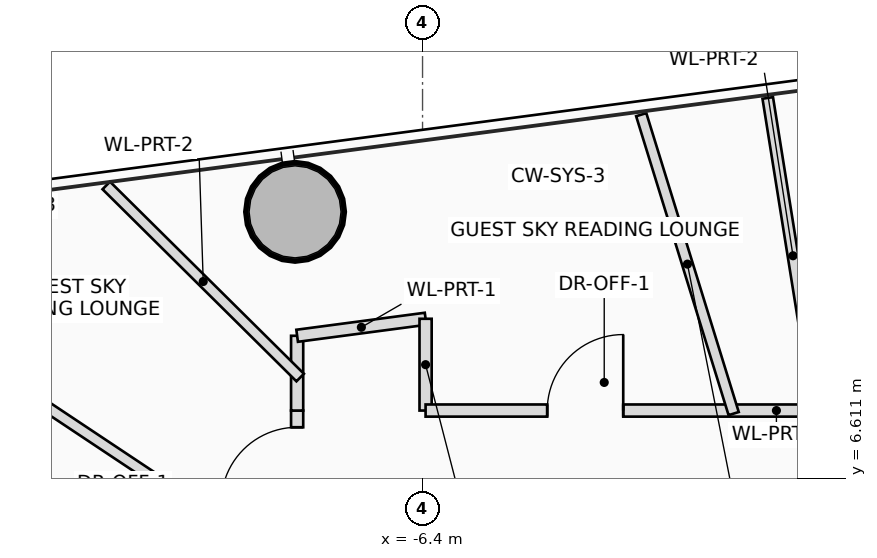
"""IFC4 building model, lengths in metres.
Left out: names, types, materials, properties, quantities, classifications, styles, units other than length and angle.
Written with IfcOpenShell. Run it as: python <this file> out.ifc"""

import sys

from ifc_helpers import new_model, si_unit, direction, frame, frame_2d, origin, origin_2d, place, context, subcontext, project, spatial, rectangle, hollow_circle, extrude, source, transform, mapped, element, fill, save


model = new_model("IFC4")
c1 = context("Model", 3, precision=1e-05, world=origin(), true_north=direction((0.0, 1.0)))
c2 = subcontext(c1, "Body", "Model", "MODEL_VIEW")
j1 = project(units=[si_unit("LENGTHUNIT", "METRE"), si_unit("PLANEANGLEUNIT", "RADIAN")], contexts=[c1])
p1 = place(None, origin())
s1 = spatial("IfcSite", under=j1, at=p1, CompositionType="ELEMENT")
p2 = place(p1, origin())
s2 = spatial("IfcBuilding", under=s1, at=p2, CompositionType="ELEMENT")
p3 = place(p2, frame((0.0, 0.0, 158.75)))
s3 = spatial("IfcBuildingStorey", under=s2, at=p3, CompositionType="ELEMENT", Elevation=158.75)
m1 = source(origin(), c2, "Body", "SweptSolid", [
    extrude(hollow_circle(Radius=0.65, WallThickness=0.045, at=origin_2d()), origin(), (0.0, 0.0, 1.0), 3.45),
])
p4 = place(p3, frame((-8.077, 10.114, 0.0), z_axis=(0.0, 0.0, 1.0), x_axis=(1.0, 0.0, 0.0)))
e1 = element("IfcColumn", 1, at=p4, inside=s3, PredefinedType="COLUMN", context=c2, shape_type="MappedRepresentation", body=[
    mapped(m1, transform((0.0, 0.0, 0.0), scale=1.0)),
])
p5 = place(p3, frame((-8.05, -7.5, 0.0), z_axis=(0.0, 0.0, 1.0), x_axis=(0.0, 1.0, 0.0)))
e2 = element("IfcWall", 2, at=p5, inside=s3, PredefinedType="PARTITIONING", context=c2, shape_type="SweptSolid", body=[
    extrude(rectangle(XDim=15.0, YDim=0.16, at=frame_2d((7.5, 0.0))), origin(), (0.0, 0.0, 1.0), 2.605),
])
p6 = place(p5, frame((6.753, 0.0, 0.0)))
e3 = element("IfcOpeningElement", 3, at=p6, cuts=e2, PredefinedType="OPENING", context=c2, shape_type="SweptSolid", body=[
    extrude(rectangle(XDim=1.05, YDim=2.2, at=frame_2d((0.525, 1.1))), frame((0.0, 0.09, 0.0), z_axis=(0.0, -1.0, 0.0), x_axis=(1.0, 0.0, 0.0)), (0.0, 0.0, 1.0), 0.18),
])
p7 = place(p5, frame((10.436, 0.0, 0.0)))
e4 = element("IfcOpeningElement", 4, at=p7, cuts=e2, PredefinedType="OPENING", context=c2, shape_type="SweptSolid", body=[
    extrude(rectangle(XDim=1.05, YDim=2.2, at=frame_2d((0.525, 1.1))), frame((0.0, 0.09, 0.0), z_axis=(0.0, -1.0, 0.0), x_axis=(1.0, 0.0, 0.0)), (0.0, 0.0, 1.0), 0.18),
])
p8 = place(p5, frame((13.78, 0.0, 0.0)))
e5 = element("IfcOpeningElement", 5, at=p8, cuts=e2, PredefinedType="OPENING", context=c2, shape_type="SweptSolid", body=[
    extrude(rectangle(XDim=1.0, YDim=2.25, at=frame_2d((0.5, 1.125))), frame((0.0, 0.09, 0.0), z_axis=(0.0, -1.0, 0.0), x_axis=(1.0, 0.0, 0.0)), (0.0, 0.0, 1.0), 0.18),
])
p9 = place(p3, frame((-8.05, 7.5, 0.0), z_axis=(0.0, 0.0, 1.0), x_axis=(0.0, 1.0, 0.0)))
e6 = element("IfcWall", 6, at=p9, inside=s3, PredefinedType="PARTITIONING", context=c2, shape_type="SweptSolid", body=[
    extrude(rectangle(XDim=0.984, YDim=0.16, at=frame_2d((0.492, 0.0))), origin(), (0.0, 0.0, 1.0), 2.805),
])
p10 = place(p3, frame((-8.05, 8.484, 0.0), z_axis=(0.0, 0.0, 1.0), x_axis=(0.991338869543, 0.131328769629, 0.0)))
e7 = element("IfcWall", 7, at=p10, inside=s3, PredefinedType="PARTITIONING", context=c2, shape_type="SweptSolid", body=[
    extrude(rectangle(XDim=1.705, YDim=0.16, at=frame_2d((0.852, 0.0))), origin(), (0.0, 0.0, 1.0), 2.605),
])
p11 = place(p3, frame((-6.36, 8.708, 0.0), z_axis=(0.0, 0.0, 1.0), x_axis=(0.0, -1.0, 0.0)))
e8 = element("IfcWall", 8, at=p11, inside=s3, PredefinedType="PARTITIONING", context=c2, shape_type="SweptSolid", body=[
    extrude(rectangle(XDim=1.208, YDim=0.16, at=frame_2d((0.604, 0.0))), origin(), (0.0, 0.0, 1.0), 2.805),
])
p12 = place(p3, frame((-6.36, 7.5, 0.0), z_axis=(0.0, 0.0, 1.0), x_axis=(1.0, 0.0, 0.0)))
e9 = element("IfcWall", 9, at=p12, inside=s3, PredefinedType="PARTITIONING", context=c2, shape_type="SweptSolid", body=[
    extrude(rectangle(XDim=11.61, YDim=0.16, at=frame_2d((5.805, 0.0))), origin(), (0.0, 0.0, 1.0), 2.605),
])
p13 = place(p12, frame((1.6, 0.0, 0.0)))
e10 = element("IfcOpeningElement", 10, at=p13, cuts=e9, PredefinedType="OPENING", context=c2, shape_type="SweptSolid", body=[
    extrude(rectangle(XDim=1.0, YDim=2.25, at=frame_2d((0.5, 1.125))), frame((0.0, 0.09, 0.0), z_axis=(0.0, -1.0, 0.0), x_axis=(1.0, 0.0, 0.0)), (0.0, 0.0, 1.0), 0.18),
])
p14 = place(p12, frame((6.631, 0.0, 0.0)))
e11 = element("IfcOpeningElement", 11, at=p14, cuts=e9, PredefinedType="OPENING", context=c2, shape_type="SweptSolid", body=[
    extrude(rectangle(XDim=1.0, YDim=2.25, at=frame_2d((0.5, 1.125))), frame((0.0, 0.09, 0.0), z_axis=(0.0, -1.0, 0.0), x_axis=(1.0, 0.0, 0.0)), (0.0, 0.0, 1.0), 0.18),
])
p15 = place(p12, frame((9.773, 0.0, 0.0)))
e12 = element("IfcOpeningElement", 12, at=p15, cuts=e9, PredefinedType="OPENING", context=c2, shape_type="SweptSolid", body=[
    extrude(rectangle(XDim=1.0, YDim=2.25, at=frame_2d((0.5, 1.125))), frame((0.0, 0.09, 0.0), z_axis=(0.0, -1.0, 0.0), x_axis=(1.0, 0.0, 0.0)), (0.0, 0.0, 1.0), 0.18),
])
p16 = place(p3, frame((-1.194, 7.46, 0.0), z_axis=(0.0, 0.0, 1.0), x_axis=(-0.157995028697, 0.987439907492, 0.0)))
e13 = element("IfcWall", 13, at=p16, inside=s3, PredefinedType="PARTITIONING", context=c2, shape_type="SweptSolid", body=[
    extrude(rectangle(XDim=4.206, YDim=0.14, at=frame_2d((2.103, 0.0))), origin(), (0.0, 0.0, 1.0), 2.605),
])
p17 = place(p3, frame((-2.307, 7.46, 0.0), z_axis=(0.0, 0.0, 1.0), x_axis=(-0.295406664686, 0.955371604382, 0.0)))
e14 = element("IfcWall", 14, at=p17, inside=s3, PredefinedType="PARTITIONING", context=c2, shape_type="SweptSolid", body=[
    extrude(rectangle(XDim=4.117, YDim=0.14, at=frame_2d((2.058, 0.0))), origin(), (0.0, 0.0, 1.0), 2.605),
])
p18 = place(p3, frame((-8.01, 7.934, 0.0), z_axis=(0.0, 0.0, 1.0), x_axis=(-0.710464129117, 0.703733416315, 0.0)))
e15 = element("IfcWall", 15, at=p18, inside=s3, PredefinedType="PARTITIONING", context=c2, shape_type="SweptSolid", body=[
    extrude(rectangle(XDim=3.591, YDim=0.14, at=frame_2d((1.795, 0.0))), origin(), (0.0, 0.0, 1.0), 2.765),
])
p19 = place(p3, frame((-8.01, 5.329, 0.0), z_axis=(0.0, 0.0, 1.0), x_axis=(-0.832565256492, 0.553926975044, 0.0)))
e16 = element("IfcWall", 16, at=p19, inside=s3, PredefinedType="PARTITIONING", context=c2, shape_type="SweptSolid", body=[
    extrude(rectangle(XDim=8.236, YDim=0.14, at=frame_2d((4.118, 0.0))), origin(), (0.0, 0.0, 1.0), 2.605),
])
p20 = place(p8, origin())
e17 = element("IfcDoor", 17, at=p20, inside=s3, OperationType="SINGLE_SWING_LEFT", PredefinedType="DOOR", context=c2, shape_type="SweptSolid", body=[
    extrude(rectangle(XDim=1.0, YDim=2.25, at=frame_2d((0.5, 1.125))), frame((0.0, 0.025, 0.0), z_axis=(0.0, -1.0, 0.0), x_axis=(1.0, 0.0, 0.0)), (0.0, 0.0, 1.0), 0.05),
])
fill(e5, e17)
p21 = place(p13, origin())
e18 = element("IfcDoor", 18, at=p21, inside=s3, OperationType="SINGLE_SWING_RIGHT", PredefinedType="DOOR", context=c2, shape_type="SweptSolid", body=[
    extrude(rectangle(XDim=1.0, YDim=2.25, at=frame_2d((0.5, 1.125))), frame((0.0, 0.025, 0.0), z_axis=(0.0, -1.0, 0.0), x_axis=(1.0, 0.0, 0.0)), (0.0, 0.0, 1.0), 0.05),
])
fill(e10, e18)
save(model, sys.argv[1])
